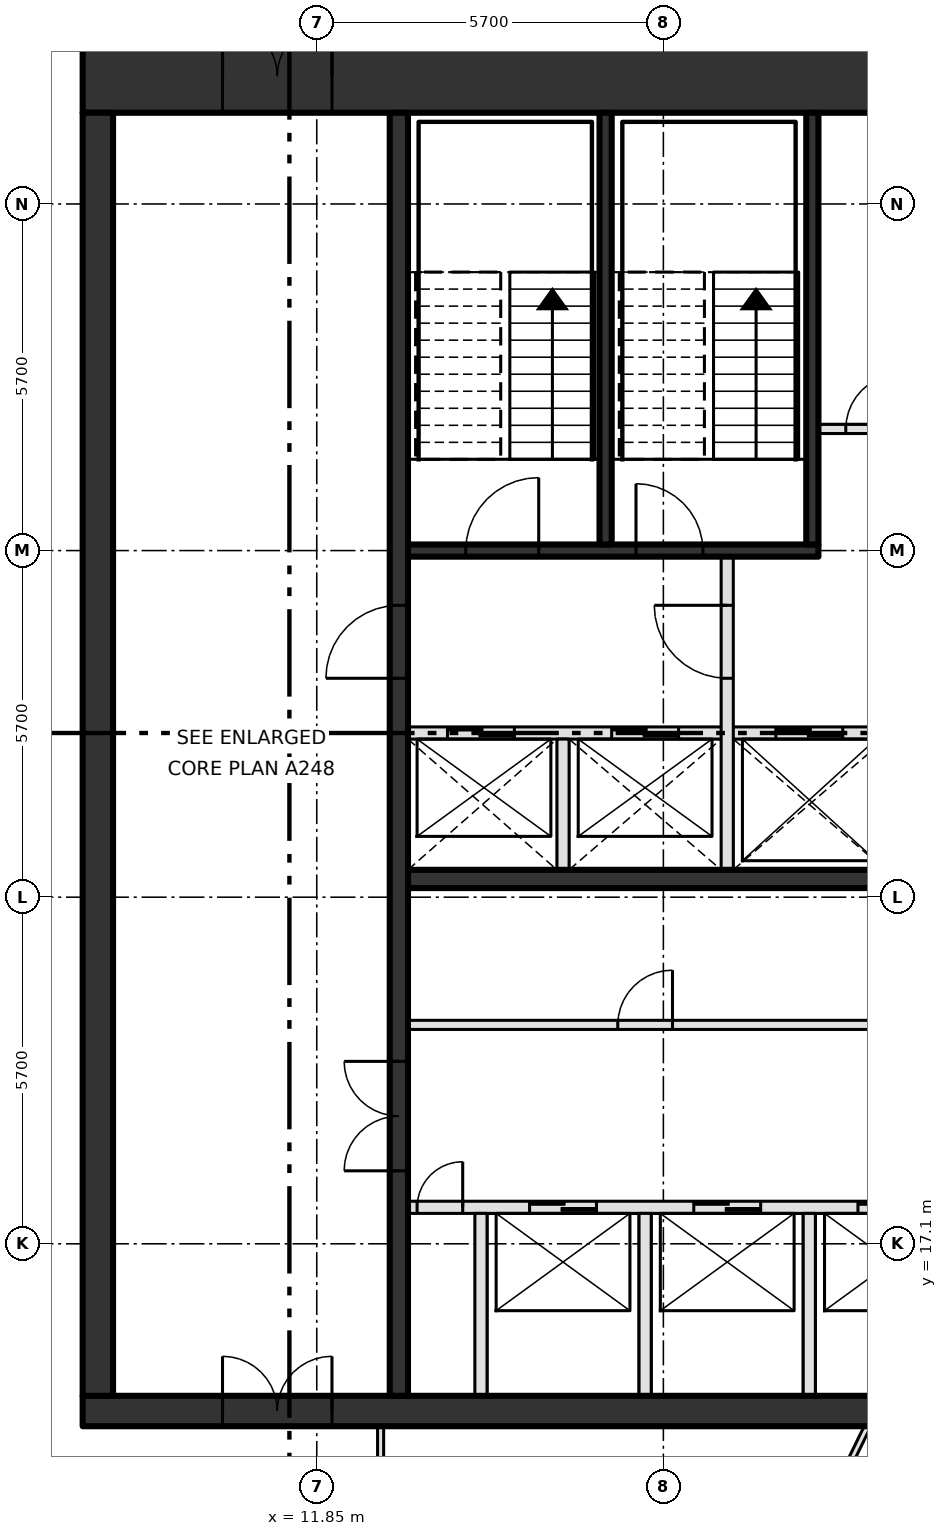
"""IFC4 building model, lengths in metres.
Left out: names, types, materials, properties, quantities, classifications, styles, units other than length and angle.
Written with IfcOpenShell. Run it as: python <this file> out.ifc"""

import sys

from ifc_helpers import new_model, si_unit, direction, frame, frame_2d, origin, place, context, subcontext, project, spatial, rectangle, extrude, element, fill, save


model = new_model("IFC4")
c1 = context("Model", 3, precision=1e-05, world=origin(), true_north=direction((0.0, 1.0)))
c2 = subcontext(c1, "Body", "Model", "MODEL_VIEW")
j1 = project(units=[si_unit("LENGTHUNIT", "METRE"), si_unit("PLANEANGLEUNIT", "RADIAN")], contexts=[c1])
p1 = place(None, origin())
s1 = spatial("IfcSite", under=j1, at=p1, CompositionType="ELEMENT")
p2 = place(p1, origin())
s2 = spatial("IfcBuilding", under=s1, at=p2, CompositionType="ELEMENT")
p3 = place(p2, frame((0.0, 0.0, 375.0)))
s3 = spatial("IfcBuildingStorey", under=s2, at=p3, CompositionType="ELEMENT", Elevation=375.0)
p4 = place(p3, frame((8.0, 14.35, -0.3), z_axis=(0.0, 0.0, 1.0), x_axis=(1.0, 0.0, 0.0)))
e1 = element("IfcWall", 1, at=p4, inside=s3, PredefinedType="SHEAR", context=c2, shape_type="SweptSolid", body=[
    extrude(rectangle(XDim=22.8, YDim=0.5, at=frame_2d((11.4, 0.0))), origin(), (0.0, 0.0, 1.0), 4.2),
])
p5 = place(p4, frame((2.3, 0.0, 0.3)))
e2 = element("IfcOpeningElement", 2, at=p5, cuts=e1, PredefinedType="OPENING", context=c2, shape_type="SweptSolid", body=[
    extrude(rectangle(XDim=1.8, YDim=2.1, at=frame_2d((0.9, 1.05))), frame((0.0, 0.26, 0.0), z_axis=(0.0, -1.0, 0.0), x_axis=(1.0, 0.0, 0.0)), (0.0, 0.0, 1.0), 0.52),
])
p6 = place(p3, frame((8.0, 36.3, -0.3), z_axis=(0.0, 0.0, 1.0), x_axis=(1.0, 0.0, 0.0)))
e3 = element("IfcWall", 3, at=p6, inside=s3, PredefinedType="SHEAR", context=c2, shape_type="SweptSolid", body=[
    extrude(rectangle(XDim=22.8, YDim=1.2, at=frame_2d((11.4, 0.0))), origin(), (0.0, 0.0, 1.0), 4.2),
])
p7 = place(p6, frame((2.3, 0.0, 0.3)))
e4 = element("IfcOpeningElement", 4, at=p7, cuts=e3, PredefinedType="OPENING", context=c2, shape_type="SweptSolid", body=[
    extrude(rectangle(XDim=1.8, YDim=2.1, at=frame_2d((0.9, 1.05))), frame((0.0, 0.61, 0.0), z_axis=(0.0, -1.0, 0.0), x_axis=(1.0, 0.0, 0.0)), (0.0, 0.0, 1.0), 1.22),
])
p8 = place(p3, frame((8.25, 14.6, -0.3), z_axis=(0.0, 0.0, 1.0), x_axis=(0.0, 1.0, 0.0)))
e5 = element("IfcWall", 5, at=p8, inside=s3, PredefinedType="SHEAR", context=c2, shape_type="SweptSolid", body=[
    extrude(rectangle(XDim=21.1, YDim=0.5, at=frame_2d((10.55, 0.0))), origin(), (0.0, 0.0, 1.0), 4.2),
])
p9 = place(p3, frame((13.35, 17.7, 0.0), z_axis=(0.0, 0.0, 1.0), x_axis=(1.0, 0.0, 0.0)))
e6 = element("IfcWall", 6, at=p9, inside=s3, PredefinedType="SOLIDWALL", context=c2, shape_type="SweptSolid", body=[
    extrude(rectangle(XDim=13.425, YDim=0.2, at=frame_2d((6.712, 0.0))), origin(), (0.0, 0.0, 1.0), 3.9),
])
p10 = place(p9, frame((2.0, 0.0, 0.0)))
e7 = element("IfcOpeningElement", 7, at=p10, cuts=e6, PredefinedType="OPENING", context=c2, shape_type="SweptSolid", body=[
    extrude(rectangle(XDim=1.1, YDim=2.1, at=frame_2d((0.55, 1.05))), frame((0.0, 0.11, 0.0), z_axis=(0.0, -1.0, 0.0), x_axis=(1.0, 0.0, 0.0)), (0.0, 0.0, 1.0), 0.22),
])
p11 = place(p9, frame((4.7, 0.0, 0.0)))
e8 = element("IfcOpeningElement", 8, at=p11, cuts=e6, PredefinedType="OPENING", context=c2, shape_type="SweptSolid", body=[
    extrude(rectangle(XDim=1.1, YDim=2.1, at=frame_2d((0.55, 1.05))), frame((0.0, 0.11, 0.0), z_axis=(0.0, -1.0, 0.0), x_axis=(1.0, 0.0, 0.0)), (0.0, 0.0, 1.0), 0.22),
])
p12 = place(p9, frame((7.4, 0.0, 0.0)))
e9 = element("IfcOpeningElement", 9, at=p12, cuts=e6, PredefinedType="OPENING", context=c2, shape_type="SweptSolid", body=[
    extrude(rectangle(XDim=1.1, YDim=2.1, at=frame_2d((0.55, 1.05))), frame((0.0, 0.11, 0.0), z_axis=(0.0, -1.0, 0.0), x_axis=(1.0, 0.0, 0.0)), (0.0, 0.0, 1.0), 0.22),
])
p13 = place(p9, frame((10.1, 0.0, 0.0)))
e10 = element("IfcOpeningElement", 10, at=p13, cuts=e6, PredefinedType="OPENING", context=c2, shape_type="SweptSolid", body=[
    extrude(rectangle(XDim=1.1, YDim=2.1, at=frame_2d((0.55, 1.05))), frame((0.0, 0.11, 0.0), z_axis=(0.0, -1.0, 0.0), x_axis=(1.0, 0.0, 0.0)), (0.0, 0.0, 1.0), 0.22),
])
p14 = place(p9, frame((0.15, 0.0, 0.0)))
e11 = element("IfcOpeningElement", 11, at=p14, cuts=e6, PredefinedType="OPENING", context=c2, shape_type="SweptSolid", body=[
    extrude(rectangle(XDim=0.75, YDim=2.1, at=frame_2d((0.375, 1.05))), frame((0.0, 0.11, 0.0), z_axis=(0.0, -1.0, 0.0), x_axis=(1.0, 0.0, 0.0)), (0.0, 0.0, 1.0), 0.22),
])
p15 = place(p9, frame((12.3, 0.0, 0.0)))
e12 = element("IfcOpeningElement", 12, at=p15, cuts=e6, PredefinedType="OPENING", context=c2, shape_type="SweptSolid", body=[
    extrude(rectangle(XDim=0.75, YDim=2.1, at=frame_2d((0.375, 1.05))), frame((0.0, 0.11, 0.0), z_axis=(0.0, -1.0, 0.0), x_axis=(1.0, 0.0, 0.0)), (0.0, 0.0, 1.0), 0.22),
])
p16 = place(p3, frame((13.35, 20.7, 0.0), z_axis=(0.0, 0.0, 1.0), x_axis=(1.0, 0.0, 0.0)))
e13 = element("IfcWall", 13, at=p16, inside=s3, PredefinedType="PARTITIONING", context=c2, shape_type="SweptSolid", body=[
    extrude(rectangle(XDim=13.425, YDim=0.15, at=frame_2d((6.712, 0.0))), origin(), (0.0, 0.0, 1.0), 3.9),
])
p17 = place(p16, frame((3.45, 0.0, 0.0)))
e14 = element("IfcOpeningElement", 14, at=p17, cuts=e13, PredefinedType="OPENING", context=c2, shape_type="SweptSolid", body=[
    extrude(rectangle(XDim=0.9, YDim=2.1, at=frame_2d((0.45, 1.05))), frame((0.0, 0.085, 0.0), z_axis=(0.0, -1.0, 0.0), x_axis=(1.0, 0.0, 0.0)), (0.0, 0.0, 1.0), 0.17),
])
p18 = place(p16, frame((10.2, 0.0, 0.0)))
e15 = element("IfcOpeningElement", 15, at=p18, cuts=e13, PredefinedType="OPENING", context=c2, shape_type="SweptSolid", body=[
    extrude(rectangle(XDim=0.9, YDim=2.1, at=frame_2d((0.45, 1.05))), frame((0.0, 0.085, 0.0), z_axis=(0.0, -1.0, 0.0), x_axis=(1.0, 0.0, 0.0)), (0.0, 0.0, 1.0), 0.17),
])
p19 = place(p3, frame((13.35, 23.1, 0.0), z_axis=(0.0, 0.0, 1.0), x_axis=(1.0, 0.0, 0.0)))
e16 = element("IfcWall", 16, at=p19, inside=s3, PredefinedType="SHEAR", context=c2, shape_type="SweptSolid", body=[
    extrude(rectangle(XDim=16.95, YDim=0.3, at=frame_2d((8.475, 0.0))), origin(), (0.0, 0.0, 1.0), 3.9),
])
p20 = place(p3, frame((13.35, 25.5, 0.0), z_axis=(0.0, 0.0, 1.0), x_axis=(1.0, 0.0, 0.0)))
e17 = element("IfcWall", 17, at=p20, inside=s3, PredefinedType="SOLIDWALL", context=c2, shape_type="SweptSolid", body=[
    extrude(rectangle(XDim=16.95, YDim=0.2, at=frame_2d((8.475, 0.0))), origin(), (0.0, 0.0, 1.0), 3.9),
])
p21 = place(p20, frame((0.65, 0.0, 0.0)))
e18 = element("IfcOpeningElement", 18, at=p21, cuts=e17, PredefinedType="OPENING", context=c2, shape_type="SweptSolid", body=[
    extrude(rectangle(XDim=1.1, YDim=2.1, at=frame_2d((0.55, 1.05))), frame((0.0, 0.11, 0.0), z_axis=(0.0, -1.0, 0.0), x_axis=(1.0, 0.0, 0.0)), (0.0, 0.0, 1.0), 0.22),
])
p22 = place(p20, frame((3.35, 0.0, 0.0)))
e19 = element("IfcOpeningElement", 19, at=p22, cuts=e17, PredefinedType="OPENING", context=c2, shape_type="SweptSolid", body=[
    extrude(rectangle(XDim=1.1, YDim=2.1, at=frame_2d((0.55, 1.05))), frame((0.0, 0.11, 0.0), z_axis=(0.0, -1.0, 0.0), x_axis=(1.0, 0.0, 0.0)), (0.0, 0.0, 1.0), 0.22),
])
p23 = place(p20, frame((6.05, 0.0, 0.0)))
e20 = element("IfcOpeningElement", 20, at=p23, cuts=e17, PredefinedType="OPENING", context=c2, shape_type="SweptSolid", body=[
    extrude(rectangle(XDim=1.1, YDim=2.1, at=frame_2d((0.55, 1.05))), frame((0.0, 0.11, 0.0), z_axis=(0.0, -1.0, 0.0), x_axis=(1.0, 0.0, 0.0)), (0.0, 0.0, 1.0), 0.22),
])
p24 = place(p20, frame((8.75, 0.0, 0.0)))
e21 = element("IfcOpeningElement", 21, at=p24, cuts=e17, PredefinedType="OPENING", context=c2, shape_type="SweptSolid", body=[
    extrude(rectangle(XDim=1.1, YDim=2.1, at=frame_2d((0.55, 1.05))), frame((0.0, 0.11, 0.0), z_axis=(0.0, -1.0, 0.0), x_axis=(1.0, 0.0, 0.0)), (0.0, 0.0, 1.0), 0.22),
])
p25 = place(p20, frame((13.0, 0.0, 0.0)))
e22 = element("IfcOpeningElement", 22, at=p25, cuts=e17, PredefinedType="OPENING", context=c2, shape_type="SweptSolid", body=[
    extrude(rectangle(XDim=0.9, YDim=2.1, at=frame_2d((0.45, 1.05))), frame((0.0, 0.11, 0.0), z_axis=(0.0, -1.0, 0.0), x_axis=(1.0, 0.0, 0.0)), (0.0, 0.0, 1.0), 0.22),
])
p26 = place(p3, frame((13.35, 28.5, 0.0), z_axis=(0.0, 0.0, 1.0), x_axis=(1.0, 0.0, 0.0)))
e23 = element("IfcWall", 23, at=p26, inside=s3, PredefinedType="SOLIDWALL", context=c2, shape_type="SweptSolid", body=[
    extrude(rectangle(XDim=6.75, YDim=0.2, at=frame_2d((3.375, 0.0))), origin(), (0.0, 0.0, 1.0), 3.9),
])
p27 = place(p26, frame((0.95, 0.0, 0.0)))
e24 = element("IfcOpeningElement", 24, at=p27, cuts=e23, PredefinedType="OPENING", context=c2, shape_type="SweptSolid", body=[
    extrude(rectangle(XDim=1.2, YDim=2.1, at=frame_2d((0.6, 1.05))), frame((0.0, 0.11, 0.0), z_axis=(0.0, -1.0, 0.0), x_axis=(1.0, 0.0, 0.0)), (0.0, 0.0, 1.0), 0.22),
])
p28 = place(p26, frame((3.75, 0.0, 0.0)))
e25 = element("IfcOpeningElement", 25, at=p28, cuts=e23, PredefinedType="OPENING", context=c2, shape_type="SweptSolid", body=[
    extrude(rectangle(XDim=1.1, YDim=2.1, at=frame_2d((0.55, 1.05))), frame((0.0, 0.11, 0.0), z_axis=(0.0, -1.0, 0.0), x_axis=(1.0, 0.0, 0.0)), (0.0, 0.0, 1.0), 0.22),
])
p29 = place(p3, frame((20.1, 30.5, 0.0), z_axis=(0.0, 0.0, 1.0), x_axis=(1.0, 0.0, 0.0)))
e26 = element("IfcWall", 26, at=p29, inside=s3, PredefinedType="PARTITIONING", context=c2, shape_type="SweptSolid", body=[
    extrude(rectangle(XDim=10.2, YDim=0.15, at=frame_2d((5.1, 0.0))), origin(), (0.0, 0.0, 1.0), 3.9),
])
p30 = place(p29, frame((0.45, 0.0, 0.0)))
e27 = element("IfcOpeningElement", 27, at=p30, cuts=e26, PredefinedType="OPENING", context=c2, shape_type="SweptSolid", body=[
    extrude(rectangle(XDim=0.9, YDim=2.1, at=frame_2d((0.45, 1.05))), frame((0.0, 0.085, 0.0), z_axis=(0.0, -1.0, 0.0), x_axis=(1.0, 0.0, 0.0)), (0.0, 0.0, 1.0), 0.17),
])
p31 = place(p29, frame((3.35, 0.0, 0.0)))
e28 = element("IfcOpeningElement", 28, at=p31, cuts=e26, PredefinedType="OPENING", context=c2, shape_type="SweptSolid", body=[
    extrude(rectangle(XDim=0.9, YDim=2.1, at=frame_2d((0.45, 1.05))), frame((0.0, 0.085, 0.0), z_axis=(0.0, -1.0, 0.0), x_axis=(1.0, 0.0, 0.0)), (0.0, 0.0, 1.0), 0.17),
])
p32 = place(p29, frame((7.15, 0.0, 0.0)))
e29 = element("IfcOpeningElement", 29, at=p32, cuts=e26, PredefinedType="OPENING", context=c2, shape_type="SweptSolid", body=[
    extrude(rectangle(XDim=0.9, YDim=2.1, at=frame_2d((0.45, 1.05))), frame((0.0, 0.085, 0.0), z_axis=(0.0, -1.0, 0.0), x_axis=(1.0, 0.0, 0.0)), (0.0, 0.0, 1.0), 0.17),
])
p33 = place(p3, frame((13.2, 14.6, 0.0), z_axis=(0.0, 0.0, 1.0), x_axis=(0.0, 1.0, 0.0)))
e30 = element("IfcWall", 30, at=p33, inside=s3, PredefinedType="SHEAR", context=c2, shape_type="SweptSolid", body=[
    extrude(rectangle(XDim=21.1, YDim=0.3, at=frame_2d((10.55, 0.0))), origin(), (0.0, 0.0, 1.0), 3.9),
])
p34 = place(p33, frame((3.7, 0.0, 0.0)))
e31 = element("IfcOpeningElement", 31, at=p34, cuts=e30, PredefinedType="OPENING", context=c2, shape_type="SweptSolid", body=[
    extrude(rectangle(XDim=1.8, YDim=2.1, at=frame_2d((0.9, 1.05))), frame((0.0, 0.16, 0.0), z_axis=(0.0, -1.0, 0.0), x_axis=(1.0, 0.0, 0.0)), (0.0, 0.0, 1.0), 0.32),
])
p35 = place(p33, frame((11.8, 0.0, 0.0)))
e32 = element("IfcOpeningElement", 32, at=p35, cuts=e30, PredefinedType="OPENING", context=c2, shape_type="SweptSolid", body=[
    extrude(rectangle(XDim=1.2, YDim=2.1, at=frame_2d((0.6, 1.05))), frame((0.0, 0.16, 0.0), z_axis=(0.0, -1.0, 0.0), x_axis=(1.0, 0.0, 0.0)), (0.0, 0.0, 1.0), 0.32),
])
p36 = place(p3, frame((14.55, 14.6, 0.0), z_axis=(0.0, 0.0, 1.0), x_axis=(0.0, 1.0, 0.0)))
e33 = element("IfcWall", 33, at=p36, inside=s3, PredefinedType="SOLIDWALL", context=c2, shape_type="SweptSolid", body=[
    extrude(rectangle(XDim=3.0, YDim=0.2, at=frame_2d((1.5, 0.0))), origin(), (0.0, 0.0, 1.0), 3.9),
])
p37 = place(p3, frame((15.9, 23.25, 0.0), z_axis=(0.0, 0.0, 1.0), x_axis=(0.0, 1.0, 0.0)))
e34 = element("IfcWall", 34, at=p37, inside=s3, PredefinedType="SOLIDWALL", context=c2, shape_type="SweptSolid", body=[
    extrude(rectangle(XDim=2.15, YDim=0.2, at=frame_2d((1.075, 0.0))), origin(), (0.0, 0.0, 1.0), 3.9),
])
p38 = place(p3, frame((16.6, 28.6, 0.0), z_axis=(0.0, 0.0, 1.0), x_axis=(0.0, 1.0, 0.0)))
e35 = element("IfcWall", 35, at=p38, inside=s3, PredefinedType="SOLIDWALL", context=c2, shape_type="SweptSolid", body=[
    extrude(rectangle(XDim=7.1, YDim=0.2, at=frame_2d((3.55, 0.0))), origin(), (0.0, 0.0, 1.0), 3.9),
])
p39 = place(p3, frame((17.25, 14.6, 0.0), z_axis=(0.0, 0.0, 1.0), x_axis=(0.0, 1.0, 0.0)))
e36 = element("IfcWall", 36, at=p39, inside=s3, PredefinedType="SOLIDWALL", context=c2, shape_type="SweptSolid", body=[
    extrude(rectangle(XDim=3.0, YDim=0.2, at=frame_2d((1.5, 0.0))), origin(), (0.0, 0.0, 1.0), 3.9),
])
p40 = place(p3, frame((18.6, 23.25, 0.0), z_axis=(0.0, 0.0, 1.0), x_axis=(0.0, 1.0, 0.0)))
e37 = element("IfcWall", 37, at=p40, inside=s3, PredefinedType="SOLIDWALL", context=c2, shape_type="SweptSolid", body=[
    extrude(rectangle(XDim=5.15, YDim=0.2, at=frame_2d((2.575, 0.0))), origin(), (0.0, 0.0, 1.0), 3.9),
])
p41 = place(p40, frame((3.15, 0.0, 0.0)))
e38 = element("IfcOpeningElement", 38, at=p41, cuts=e37, PredefinedType="OPENING", context=c2, shape_type="SweptSolid", body=[
    extrude(rectangle(XDim=1.2, YDim=2.1, at=frame_2d((0.6, 1.05))), frame((0.0, 0.11, 0.0), z_axis=(0.0, -1.0, 0.0), x_axis=(1.0, 0.0, 0.0)), (0.0, 0.0, 1.0), 0.22),
])
p42 = place(p3, frame((19.95, 14.6, 0.0), z_axis=(0.0, 0.0, 1.0), x_axis=(0.0, 1.0, 0.0)))
e39 = element("IfcWall", 39, at=p42, inside=s3, PredefinedType="SOLIDWALL", context=c2, shape_type="SweptSolid", body=[
    extrude(rectangle(XDim=3.0, YDim=0.2, at=frame_2d((1.5, 0.0))), origin(), (0.0, 0.0, 1.0), 3.9),
])
p43 = place(p3, frame((20.0, 28.6, 0.0), z_axis=(0.0, 0.0, 1.0), x_axis=(0.0, 1.0, 0.0)))
e40 = element("IfcWall", 40, at=p43, inside=s3, PredefinedType="SOLIDWALL", context=c2, shape_type="SweptSolid", body=[
    extrude(rectangle(XDim=7.1, YDim=0.2, at=frame_2d((3.55, 0.0))), origin(), (0.0, 0.0, 1.0), 3.9),
])
p44 = place(p3, frame((12.9, 10.078, 0.0), z_axis=(0.0, 0.0, 1.0), x_axis=(0.0, 1.0, 0.0)))
e41 = element("IfcWall", 41, at=p44, inside=s3, PredefinedType="PARTITIONING", context=c2, shape_type="SweptSolid", body=[
    extrude(rectangle(XDim=4.022, YDim=0.1, at=frame_2d((2.011, 0.0))), origin(), (0.0, 0.0, 1.0), 3.9),
])
p45 = place(p3, frame((18.105, 8.354, 0.0), z_axis=(0.0, 0.0, 1.0), x_axis=(0.438424384383, 0.898768078638, 0.0)))
e42 = element("IfcWall", 42, at=p45, inside=s3, PredefinedType="PARTITIONING", context=c2, shape_type="SweptSolid", body=[
    extrude(rectangle(XDim=6.393, YDim=0.1, at=frame_2d((3.197, 0.0))), origin(), (0.0, 0.0, 1.0), 3.9),
])
p46 = place(p10, origin())
e43 = element("IfcDoor", 43, at=p46, inside=s3, OperationType="SLIDING_TO_LEFT", PredefinedType="DOOR", context=c2, shape_type="SweptSolid", body=[
    extrude(rectangle(XDim=1.1, YDim=2.1, at=frame_2d((0.55, 1.05))), frame((0.0, 0.025, 0.0), z_axis=(0.0, -1.0, 0.0), x_axis=(1.0, 0.0, 0.0)), (0.0, 0.0, 1.0), 0.05),
])
fill(e7, e43)
p47 = place(p11, origin())
e44 = element("IfcDoor", 44, at=p47, inside=s3, OperationType="SLIDING_TO_LEFT", PredefinedType="DOOR", context=c2, shape_type="SweptSolid", body=[
    extrude(rectangle(XDim=1.1, YDim=2.1, at=frame_2d((0.55, 1.05))), frame((0.0, 0.025, 0.0), z_axis=(0.0, -1.0, 0.0), x_axis=(1.0, 0.0, 0.0)), (0.0, 0.0, 1.0), 0.05),
])
fill(e8, e44)
p48 = place(p12, origin())
e45 = element("IfcDoor", 45, at=p48, inside=s3, OperationType="SLIDING_TO_LEFT", PredefinedType="DOOR", context=c2, shape_type="SweptSolid", body=[
    extrude(rectangle(XDim=1.1, YDim=2.1, at=frame_2d((0.55, 1.05))), frame((0.0, 0.025, 0.0), z_axis=(0.0, -1.0, 0.0), x_axis=(1.0, 0.0, 0.0)), (0.0, 0.0, 1.0), 0.05),
])
fill(e9, e45)
p49 = place(p21, origin())
e46 = element("IfcDoor", 46, at=p49, inside=s3, OperationType="SLIDING_TO_LEFT", PredefinedType="DOOR", context=c2, shape_type="SweptSolid", body=[
    extrude(rectangle(XDim=1.1, YDim=2.1, at=frame_2d((0.55, 1.05))), frame((0.0, 0.025, 0.0), z_axis=(0.0, -1.0, 0.0), x_axis=(1.0, 0.0, 0.0)), (0.0, 0.0, 1.0), 0.05),
])
fill(e18, e46)
p50 = place(p22, origin())
e47 = element("IfcDoor", 47, at=p50, inside=s3, OperationType="SLIDING_TO_LEFT", PredefinedType="DOOR", context=c2, shape_type="SweptSolid", body=[
    extrude(rectangle(XDim=1.1, YDim=2.1, at=frame_2d((0.55, 1.05))), frame((0.0, 0.025, 0.0), z_axis=(0.0, -1.0, 0.0), x_axis=(1.0, 0.0, 0.0)), (0.0, 0.0, 1.0), 0.05),
])
fill(e19, e47)
p51 = place(p23, origin())
e48 = element("IfcDoor", 48, at=p51, inside=s3, OperationType="SLIDING_TO_LEFT", PredefinedType="DOOR", context=c2, shape_type="SweptSolid", body=[
    extrude(rectangle(XDim=1.1, YDim=2.1, at=frame_2d((0.55, 1.05))), frame((0.0, 0.025, 0.0), z_axis=(0.0, -1.0, 0.0), x_axis=(1.0, 0.0, 0.0)), (0.0, 0.0, 1.0), 0.05),
])
fill(e20, e48)
p52 = place(p14, origin())
e49 = element("IfcDoor", 49, at=p52, inside=s3, OperationType="SINGLE_SWING_RIGHT", PredefinedType="DOOR", context=c2, shape_type="SweptSolid", body=[
    extrude(rectangle(XDim=0.75, YDim=2.1, at=frame_2d((0.375, 1.05))), frame((0.0, 0.025, 0.0), z_axis=(0.0, -1.0, 0.0), x_axis=(1.0, 0.0, 0.0)), (0.0, 0.0, 1.0), 0.05),
])
fill(e11, e49)
p53 = place(p17, origin())
e50 = element("IfcDoor", 50, at=p53, inside=s3, OperationType="SINGLE_SWING_RIGHT", PredefinedType="DOOR", context=c2, shape_type="SweptSolid", body=[
    extrude(rectangle(XDim=0.9, YDim=2.1, at=frame_2d((0.45, 1.05))), frame((0.0, 0.025, 0.0), z_axis=(0.0, -1.0, 0.0), x_axis=(1.0, 0.0, 0.0)), (0.0, 0.0, 1.0), 0.05),
])
fill(e14, e50)
p54 = place(p30, origin())
e51 = element("IfcDoor", 51, at=p54, inside=s3, OperationType="SINGLE_SWING_RIGHT", PredefinedType="DOOR", context=c2, shape_type="SweptSolid", body=[
    extrude(rectangle(XDim=0.9, YDim=2.1, at=frame_2d((0.45, 1.05))), frame((0.0, 0.025, 0.0), z_axis=(0.0, -1.0, 0.0), x_axis=(1.0, 0.0, 0.0)), (0.0, 0.0, 1.0), 0.05),
])
fill(e27, e51)
p55 = place(p27, origin())
e52 = element("IfcDoor", 52, at=p55, inside=s3, OperationType="SINGLE_SWING_RIGHT", PredefinedType="DOOR", context=c2, shape_type="SweptSolid", body=[
    extrude(rectangle(XDim=1.2, YDim=2.1, at=frame_2d((0.6, 1.05))), frame((0.0, 0.025, 0.0), z_axis=(0.0, -1.0, 0.0), x_axis=(1.0, 0.0, 0.0)), (0.0, 0.0, 1.0), 0.05),
])
fill(e24, e52)
p56 = place(p28, origin())
e53 = element("IfcDoor", 53, at=p56, inside=s3, OperationType="SINGLE_SWING_LEFT", PredefinedType="DOOR", context=c2, shape_type="SweptSolid", body=[
    extrude(rectangle(XDim=1.1, YDim=2.1, at=frame_2d((0.55, 1.05))), frame((0.0, 0.025, 0.0), z_axis=(0.0, -1.0, 0.0), x_axis=(1.0, 0.0, 0.0)), (0.0, 0.0, 1.0), 0.05),
])
fill(e25, e53)
p57 = place(p34, origin())
e54 = element("IfcDoor", 54, at=p57, inside=s3, OperationType="DOUBLE_DOOR_SINGLE_SWING", PredefinedType="DOOR", context=c2, shape_type="SweptSolid", body=[
    extrude(rectangle(XDim=1.8, YDim=2.1, at=frame_2d((0.9, 1.05))), frame((0.0, 0.025, 0.0), z_axis=(0.0, -1.0, 0.0), x_axis=(1.0, 0.0, 0.0)), (0.0, 0.0, 1.0), 0.05),
])
fill(e31, e54)
p58 = place(p35, origin())
e55 = element("IfcDoor", 55, at=p58, inside=s3, OperationType="SINGLE_SWING_LEFT", PredefinedType="DOOR", context=c2, shape_type="SweptSolid", body=[
    extrude(rectangle(XDim=1.2, YDim=2.1, at=frame_2d((0.6, 1.05))), frame((0.0, 0.025, 0.0), z_axis=(0.0, -1.0, 0.0), x_axis=(1.0, 0.0, 0.0)), (0.0, 0.0, 1.0), 0.05),
])
fill(e32, e55)
p59 = place(p41, origin())
e56 = element("IfcDoor", 56, at=p59, inside=s3, OperationType="SINGLE_SWING_RIGHT", PredefinedType="DOOR", context=c2, shape_type="SweptSolid", body=[
    extrude(rectangle(XDim=1.2, YDim=2.1, at=frame_2d((0.6, 1.05))), frame((0.0, 0.025, 0.0), z_axis=(0.0, -1.0, 0.0), x_axis=(1.0, 0.0, 0.0)), (0.0, 0.0, 1.0), 0.05),
])
fill(e38, e56)
p60 = place(p7, origin())
e57 = element("IfcDoor", 57, at=p60, inside=s3, OperationType="DOUBLE_DOOR_SINGLE_SWING", PredefinedType="DOOR", context=c2, shape_type="SweptSolid", body=[
    extrude(rectangle(XDim=1.8, YDim=2.1, at=frame_2d((0.9, 1.05))), frame((0.0, 0.025, 0.0), z_axis=(0.0, -1.0, 0.0), x_axis=(1.0, 0.0, 0.0)), (0.0, 0.0, 1.0), 0.05),
])
fill(e4, e57)
p61 = place(p5, origin())
e58 = element("IfcDoor", 58, at=p61, inside=s3, OperationType="DOUBLE_DOOR_SINGLE_SWING", PredefinedType="DOOR", context=c2, shape_type="SweptSolid", body=[
    extrude(rectangle(XDim=1.8, YDim=2.1, at=frame_2d((0.9, 1.05))), frame((0.0, 0.025, 0.0), z_axis=(0.0, -1.0, 0.0), x_axis=(1.0, 0.0, 0.0)), (0.0, 0.0, 1.0), 0.05),
])
fill(e2, e58)
save(model, sys.argv[1])
